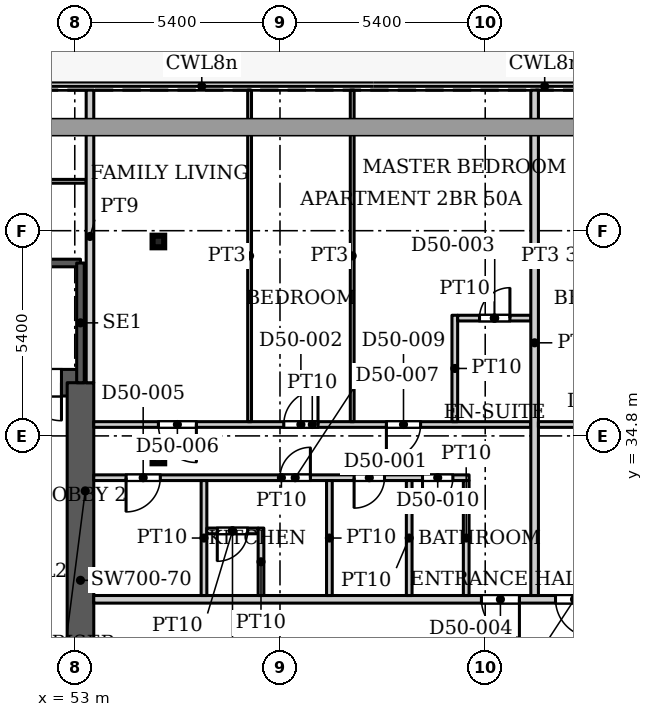
"""IFC4 building model, lengths in metres.
Left out: names, types, materials, properties, quantities, classifications, styles, units other than length and angle.
Written with IfcOpenShell. Run it as: python <this file> out.ifc"""

import sys

from ifc_helpers import new_model, si_unit, direction, frame, frame_2d, origin, origin_2d, place, context, subcontext, project, spatial, rectangle, hollow_rectangle, extrude, source, transform, mapped, element, fill, save


model = new_model("IFC4")
c1 = context("Model", 3, precision=1e-05, world=origin(), true_north=direction((0.0, 1.0)))
c2 = subcontext(c1, "Body", "Model", "MODEL_VIEW")
j1 = project(units=[si_unit("LENGTHUNIT", "METRE"), si_unit("PLANEANGLEUNIT", "RADIAN")], contexts=[c1])
p1 = place(None, origin())
s1 = spatial("IfcSite", under=j1, at=p1, CompositionType="ELEMENT")
p2 = place(p1, origin())
s2 = spatial("IfcBuilding", under=s1, at=p2, CompositionType="ELEMENT")
p3 = place(p2, frame((0.0, 0.0, 216.2)))
s3 = spatial("IfcBuildingStorey", under=s2, at=p3, CompositionType="ELEMENT", Elevation=216.2)
for number, where, z_axis, x_axis in (
    (1, (55.2, 34.232, 0.0), (0.0, 0.0, 1.0), (1.0, 0.0, 0.0)),
    (2, (55.2, 39.916, 0.0), (0.0, 0.0, 1.0), (1.0, 0.0, 0.0)),
):
    element("IfcColumn", number, at=place(p3, frame(where, z_axis=z_axis, x_axis=x_axis)), inside=s3, PredefinedType="COLUMN", context=c2, shape_type="SweptSolid", body=[
        extrude(hollow_rectangle(XDim=0.305, YDim=0.305, WallThickness=0.016, InnerFilletRadius=0.016, OuterFilletRadius=0.032, at=origin_2d()), origin(), (0.0, 0.0, 1.0), 3.9),
    ])
p4 = place(p3, frame((34.75, 36.2, 0.0), z_axis=(0.0, 0.0, 1.0), x_axis=(1.0, 0.0, 0.0)))
e3 = element("IfcWall", 3, at=p4, inside=s3, PredefinedType="SHEAR", context=c2, shape_type="SweptSolid", body=[
    extrude(rectangle(XDim=18.4, YDim=0.7, at=frame_2d((9.2, 0.0))), origin(), (0.0, 0.0, 1.0), 3.9),
])
p5 = place(p4, frame((16.9, 0.0, 0.0)))
e4 = element("IfcOpeningElement", 4, at=p5, cuts=e3, PredefinedType="OPENING", context=c2, shape_type="SweptSolid", body=[
    extrude(rectangle(XDim=1.0, YDim=2.2, at=frame_2d((0.5, 1.1))), frame((0.0, 0.36, 0.0), z_axis=(0.0, -1.0, 0.0), x_axis=(1.0, 0.0, 0.0)), (0.0, 0.0, 1.0), 0.72),
])
p6 = place(p3, frame((53.15, 25.8, 0.0), z_axis=(0.0, 0.0, 1.0), x_axis=(0.0, 1.0, 0.0)))
e5 = element("IfcWall", 5, at=p6, inside=s3, PredefinedType="SHEAR", context=c2, shape_type="SweptSolid", body=[
    extrude(rectangle(XDim=10.4, YDim=0.7, at=frame_2d((5.2, 0.0))), origin(), (0.0, 0.0, 1.0), 3.9),
])
p7 = place(p3, frame((43.99, 39.35, 0.0), z_axis=(0.0, 0.0, 1.0), x_axis=(1.0, 0.0, 0.0)))
e6 = element("IfcWall", 6, at=p7, inside=s3, PredefinedType="SHEAR", context=c2, shape_type="SweptSolid", body=[
    extrude(rectangle(XDim=9.16, YDim=0.2, at=frame_2d((4.58, 0.0))), origin(), (0.0, 0.0, 1.0), 3.9),
])
p8 = place(p3, frame((53.15, 36.2, 0.0), z_axis=(0.0, 0.0, 1.0), x_axis=(0.0, 1.0, 0.0)))
e7 = element("IfcWall", 7, at=p8, inside=s3, PredefinedType="SHEAR", context=c2, shape_type="SweptSolid", body=[
    extrude(rectangle(XDim=3.15, YDim=0.2, at=frame_2d((1.575, 0.0))), origin(), (0.0, 0.0, 1.0), 3.9),
])
p9 = place(p3, frame((38.349, 41.5, 0.0), z_axis=(0.0, 0.0, 1.0), x_axis=(1.0, 0.0, 0.0)))
e8 = element("IfcWall", 8, at=p9, inside=s3, PredefinedType="PARTITIONING", context=c2, shape_type="SweptSolid", body=[
    extrude(rectangle(XDim=14.951, YDim=0.1, at=frame_2d((7.476, 0.0))), origin(), (0.0, 0.0, 1.0), 3.6),
])
p10 = place(p9, frame((6.851, 0.0, 0.0)))
e9 = element("IfcOpeningElement", 9, at=p10, cuts=e8, PredefinedType="OPENING", context=c2, shape_type="SweptSolid", body=[
    extrude(rectangle(XDim=1.0, YDim=2.1, at=frame_2d((0.5, 1.05))), frame((0.0, 0.06, 0.0), z_axis=(0.0, -1.0, 0.0), x_axis=(1.0, 0.0, 0.0)), (0.0, 0.0, 1.0), 0.12),
])
p11 = place(p3, frame((53.4, 36.199, 0.0), z_axis=(0.0, 0.0, 1.0), x_axis=(0.0, 1.0, 0.0)))
e10 = element("IfcWall", 10, at=p11, inside=s3, PredefinedType="PARTITIONING", context=c2, shape_type="SweptSolid", body=[
    extrude(rectangle(XDim=7.701, YDim=0.2, at=frame_2d((3.851, 0.0))), origin(), (0.0, 0.0, 1.0), 3.6),
])
p12 = place(p3, frame((53.499, 30.5, 0.0), z_axis=(0.0, 0.0, 1.0), x_axis=(1.0, 0.0, 0.0)))
e11 = element("IfcWall", 11, at=p12, inside=s3, PredefinedType="PARTITIONING", context=c2, shape_type="SweptSolid", body=[
    extrude(rectangle(XDim=28.401, YDim=0.2, at=frame_2d((14.2, 0.0))), origin(), (0.0, 0.0, 1.0), 3.6),
])
p13 = place(p12, frame((10.201, 0.0, 0.0)))
e12 = element("IfcOpeningElement", 12, at=p13, cuts=e11, PredefinedType="OPENING", context=c2, shape_type="SweptSolid", body=[
    extrude(rectangle(XDim=1.0, YDim=2.1, at=frame_2d((0.5, 1.05))), frame((0.0, 0.11, 0.0), z_axis=(0.0, -1.0, 0.0), x_axis=(1.0, 0.0, 0.0)), (0.0, 0.0, 1.0), 0.22),
])
p14 = place(p12, frame((12.151, 0.0, 0.0)))
e13 = element("IfcOpeningElement", 13, at=p14, cuts=e11, PredefinedType="OPENING", context=c2, shape_type="SweptSolid", body=[
    extrude(rectangle(XDim=1.0, YDim=2.1, at=frame_2d((0.5, 1.05))), frame((0.0, 0.11, 0.0), z_axis=(0.0, -1.0, 0.0), x_axis=(1.0, 0.0, 0.0)), (0.0, 0.0, 1.0), 0.22),
])
p15 = place(p12, frame((24.001, 0.0, 0.0)))
e14 = element("IfcOpeningElement", 14, at=p15, cuts=e11, PredefinedType="OPENING", context=c2, shape_type="SweptSolid", body=[
    extrude(rectangle(XDim=1.0, YDim=2.1, at=frame_2d((0.5, 1.05))), frame((0.0, 0.11, 0.0), z_axis=(0.0, -1.0, 0.0), x_axis=(1.0, 0.0, 0.0)), (0.0, 0.0, 1.0), 0.22),
])
p16 = place(p3, frame((53.499, 33.7, 0.0), z_axis=(0.0, 0.0, 1.0), x_axis=(1.0, 0.0, 0.0)))
e15 = element("IfcWall", 15, at=p16, inside=s3, PredefinedType="PARTITIONING", context=c2, shape_type="SweptSolid", body=[
    extrude(rectangle(XDim=9.876, YDim=0.15, at=frame_2d((4.938, 0.0))), origin(), (0.0, 0.0, 1.0), 3.6),
])
p17 = place(p16, frame((6.851, 0.0, 0.0)))
e16 = element("IfcOpeningElement", 16, at=p17, cuts=e15, PredefinedType="OPENING", context=c2, shape_type="SweptSolid", body=[
    extrude(rectangle(XDim=0.8, YDim=2.1, at=frame_2d((0.4, 1.05))), frame((0.0, 0.085, 0.0), z_axis=(0.0, -1.0, 0.0), x_axis=(1.0, 0.0, 0.0)), (0.0, 0.0, 1.0), 0.17),
])
p18 = place(p16, frame((0.851, 0.0, 0.0)))
e17 = element("IfcOpeningElement", 17, at=p18, cuts=e15, PredefinedType="OPENING", context=c2, shape_type="SweptSolid", body=[
    extrude(rectangle(XDim=0.9, YDim=2.1, at=frame_2d((0.45, 1.05))), frame((0.0, 0.085, 0.0), z_axis=(0.0, -1.0, 0.0), x_axis=(1.0, 0.0, 0.0)), (0.0, 0.0, 1.0), 0.17),
])
p19 = place(p16, frame((4.901, 0.0, 0.0)))
e18 = element("IfcOpeningElement", 18, at=p19, cuts=e15, PredefinedType="OPENING", context=c2, shape_type="SweptSolid", body=[
    extrude(rectangle(XDim=0.8, YDim=2.1, at=frame_2d((0.4, 1.05))), frame((0.0, 0.085, 0.0), z_axis=(0.0, -1.0, 0.0), x_axis=(1.0, 0.0, 0.0)), (0.0, 0.0, 1.0), 0.17),
])
p20 = place(p16, frame((8.651, 0.0, 0.0)))
e19 = element("IfcOpeningElement", 19, at=p20, cuts=e15, PredefinedType="OPENING", context=c2, shape_type="SweptSolid", body=[
    extrude(rectangle(XDim=0.8, YDim=2.1, at=frame_2d((0.4, 1.05))), frame((0.0, 0.085, 0.0), z_axis=(0.0, -1.0, 0.0), x_axis=(1.0, 0.0, 0.0)), (0.0, 0.0, 1.0), 0.17),
])
p21 = place(p3, frame((53.499, 35.1, 0.0), z_axis=(0.0, 0.0, 1.0), x_axis=(1.0, 0.0, 0.0)))
e20 = element("IfcWall", 20, at=p21, inside=s3, PredefinedType="PARTITIONING", context=c2, shape_type="SweptSolid", body=[
    extrude(rectangle(XDim=11.501, YDim=0.15, at=frame_2d((5.75, 0.0))), origin(), (0.0, 0.0, 1.0), 3.6),
])
p22 = place(p21, frame((5.001, 0.0, 0.0)))
e21 = element("IfcOpeningElement", 21, at=p22, cuts=e20, PredefinedType="OPENING", context=c2, shape_type="SweptSolid", body=[
    extrude(rectangle(XDim=0.9, YDim=2.1, at=frame_2d((0.45, 1.05))), frame((0.0, 0.085, 0.0), z_axis=(0.0, -1.0, 0.0), x_axis=(1.0, 0.0, 0.0)), (0.0, 0.0, 1.0), 0.17),
])
p23 = place(p21, frame((1.701, 0.0, 0.0)))
e22 = element("IfcOpeningElement", 22, at=p23, cuts=e20, PredefinedType="OPENING", context=c2, shape_type="SweptSolid", body=[
    extrude(rectangle(XDim=1.0, YDim=2.1, at=frame_2d((0.5, 1.05))), frame((0.0, 0.085, 0.0), z_axis=(0.0, -1.0, 0.0), x_axis=(1.0, 0.0, 0.0)), (0.0, 0.0, 1.0), 0.17),
])
p24 = place(p21, frame((7.701, 0.0, 0.0)))
e23 = element("IfcOpeningElement", 23, at=p24, cuts=e20, PredefinedType="OPENING", context=c2, shape_type="SweptSolid", body=[
    extrude(rectangle(XDim=0.9, YDim=2.1, at=frame_2d((0.45, 1.05))), frame((0.0, 0.085, 0.0), z_axis=(0.0, -1.0, 0.0), x_axis=(1.0, 0.0, 0.0)), (0.0, 0.0, 1.0), 0.17),
])
p25 = place(p3, frame((56.4, 30.6, 0.0), z_axis=(0.0, 0.0, 1.0), x_axis=(0.0, 1.0, 0.0)))
e24 = element("IfcWall", 24, at=p25, inside=s3, PredefinedType="PARTITIONING", context=c2, shape_type="SweptSolid", body=[
    extrude(rectangle(XDim=3.025, YDim=0.15, at=frame_2d((1.512, 0.0))), origin(), (0.0, 0.0, 1.0), 3.6),
])
p26 = place(p3, frame((56.475, 32.3, 0.0), z_axis=(0.0, 0.0, 1.0), x_axis=(1.0, 0.0, 0.0)))
e25 = element("IfcWall", 25, at=p26, inside=s3, PredefinedType="PARTITIONING", context=c2, shape_type="SweptSolid", body=[
    extrude(rectangle(XDim=1.35, YDim=0.15, at=frame_2d((0.675, 0.0))), origin(), (0.0, 0.0, 1.0), 3.6),
])
p27 = place(p26, frame((0.275, 0.0, 0.0)))
e26 = element("IfcOpeningElement", 26, at=p27, cuts=e25, PredefinedType="OPENING", context=c2, shape_type="SweptSolid", body=[
    extrude(rectangle(XDim=0.8, YDim=2.1, at=frame_2d((0.4, 1.05))), frame((0.0, 0.085, 0.0), z_axis=(0.0, -1.0, 0.0), x_axis=(1.0, 0.0, 0.0)), (0.0, 0.0, 1.0), 0.17),
])
p28 = place(p3, frame((57.6, 35.175, 0.0), z_axis=(0.0, 0.0, 1.0), x_axis=(0.0, 1.0, 0.0)))
e27 = element("IfcWall", 27, at=p28, inside=s3, PredefinedType="PARTITIONING", context=c2, shape_type="SweptSolid", body=[
    extrude(rectangle(XDim=8.725, YDim=0.1, at=frame_2d((4.362, 0.0))), origin(), (0.0, 0.0, 1.0), 3.6),
])
p29 = place(p3, frame((57.9, 30.6, 0.0), z_axis=(0.0, 0.0, 1.0), x_axis=(0.0, 1.0, 0.0)))
e28 = element("IfcWall", 28, at=p29, inside=s3, PredefinedType="PARTITIONING", context=c2, shape_type="SweptSolid", body=[
    extrude(rectangle(XDim=1.775, YDim=0.15, at=frame_2d((0.887, 0.0))), origin(), (0.0, 0.0, 1.0), 3.6),
])
p30 = place(p3, frame((59.7, 30.6, 0.0), z_axis=(0.0, 0.0, 1.0), x_axis=(0.0, 1.0, 0.0)))
e29 = element("IfcWall", 29, at=p30, inside=s3, PredefinedType="PARTITIONING", context=c2, shape_type="SweptSolid", body=[
    extrude(rectangle(XDim=3.025, YDim=0.15, at=frame_2d((1.512, 0.0))), origin(), (0.0, 0.0, 1.0), 3.6),
])
p31 = place(p3, frame((60.3, 35.175, 0.0), z_axis=(0.0, 0.0, 1.0), x_axis=(0.0, 1.0, 0.0)))
e30 = element("IfcWall", 30, at=p31, inside=s3, PredefinedType="PARTITIONING", context=c2, shape_type="SweptSolid", body=[
    extrude(rectangle(XDim=8.725, YDim=0.1, at=frame_2d((4.362, 0.0))), origin(), (0.0, 0.0, 1.0), 3.6),
])
p32 = place(p3, frame((61.8, 30.6, 0.0), z_axis=(0.0, 0.0, 1.0), x_axis=(0.0, 1.0, 0.0)))
e31 = element("IfcWall", 31, at=p32, inside=s3, PredefinedType="PARTITIONING", context=c2, shape_type="SweptSolid", body=[
    extrude(rectangle(XDim=3.025, YDim=0.15, at=frame_2d((1.512, 0.0))), origin(), (0.0, 0.0, 1.0), 3.6),
])
p33 = place(p3, frame((63.0, 35.175, 0.0), z_axis=(0.0, 0.0, 1.0), x_axis=(0.0, 1.0, 0.0)))
e32 = element("IfcWall", 32, at=p33, inside=s3, PredefinedType="PARTITIONING", context=c2, shape_type="SweptSolid", body=[
    extrude(rectangle(XDim=2.8, YDim=0.15, at=frame_2d((1.4, 0.0))), origin(), (0.0, 0.0, 1.0), 3.6),
])
p34 = place(p3, frame((63.075, 37.9, 0.0), z_axis=(0.0, 0.0, 1.0), x_axis=(1.0, 0.0, 0.0)))
e33 = element("IfcWall", 33, at=p34, inside=s3, PredefinedType="PARTITIONING", context=c2, shape_type="SweptSolid", body=[
    extrude(rectangle(XDim=1.925, YDim=0.15, at=frame_2d((0.962, 0.0))), origin(), (0.0, 0.0, 1.0), 3.6),
])
p35 = place(p34, frame((0.575, 0.0, 0.0)))
e34 = element("IfcOpeningElement", 34, at=p35, cuts=e33, PredefinedType="OPENING", context=c2, shape_type="SweptSolid", body=[
    extrude(rectangle(XDim=0.8, YDim=2.1, at=frame_2d((0.4, 1.05))), frame((0.0, 0.085, 0.0), z_axis=(0.0, -1.0, 0.0), x_axis=(1.0, 0.0, 0.0)), (0.0, 0.0, 1.0), 0.17),
])
p36 = place(p3, frame((63.3, 30.6, 0.0), z_axis=(0.0, 0.0, 1.0), x_axis=(0.0, 1.0, 0.0)))
e35 = element("IfcWall", 35, at=p36, inside=s3, PredefinedType="PARTITIONING", context=c2, shape_type="SweptSolid", body=[
    extrude(rectangle(XDim=3.025, YDim=0.15, at=frame_2d((1.512, 0.0))), origin(), (0.0, 0.0, 1.0), 3.6),
])
p37 = place(p3, frame((65.1, 30.6, 0.0), z_axis=(0.0, 0.0, 1.0), x_axis=(0.0, 1.0, 0.0)))
e36 = element("IfcWall", 36, at=p37, inside=s3, PredefinedType="PARTITIONING", context=c2, shape_type="SweptSolid", body=[
    extrude(rectangle(XDim=13.3, YDim=0.2, at=frame_2d((6.65, 0.0))), origin(), (0.0, 0.0, 1.0), 3.6),
])
p38 = place(p3, frame((65.2, 35.1, 0.0), z_axis=(0.0, 0.0, 1.0), x_axis=(1.0, 0.0, 0.0)))
e37 = element("IfcWall", 37, at=p38, inside=s3, PredefinedType="PARTITIONING", context=c2, shape_type="SweptSolid", body=[
    extrude(rectangle(XDim=9.4, YDim=0.15, at=frame_2d((4.7, 0.0))), origin(), (0.0, 0.0, 1.0), 3.6),
])
p39 = place(p38, frame((1.4, 0.0, 0.0)))
e38 = element("IfcOpeningElement", 38, at=p39, cuts=e37, PredefinedType="OPENING", context=c2, shape_type="SweptSolid", body=[
    extrude(rectangle(XDim=0.9, YDim=2.1, at=frame_2d((0.45, 1.05))), frame((0.0, 0.085, 0.0), z_axis=(0.0, -1.0, 0.0), x_axis=(1.0, 0.0, 0.0)), (0.0, 0.0, 1.0), 0.17),
])
p40 = place(p38, frame((6.15, 0.0, 0.0)))
e39 = element("IfcOpeningElement", 39, at=p40, cuts=e37, PredefinedType="OPENING", context=c2, shape_type="SweptSolid", body=[
    extrude(rectangle(XDim=1.0, YDim=2.1, at=frame_2d((0.5, 1.05))), frame((0.0, 0.085, 0.0), z_axis=(0.0, -1.0, 0.0), x_axis=(1.0, 0.0, 0.0)), (0.0, 0.0, 1.0), 0.17),
])
m1 = source(origin(), c2, "Body", "SweptSolid", [
    extrude(rectangle(XDim=1.0, YDim=2.2, at=frame_2d((0.5, 1.1))), frame((0.0, 0.025, 0.0), z_axis=(0.0, -1.0, 0.0), x_axis=(1.0, 0.0, 0.0)), (0.0, 0.0, 1.0), 0.05),
])
p41 = place(p5, origin())
e40 = element("IfcDoor", 40, at=p41, inside=s3, OperationType="SINGLE_SWING_RIGHT", PredefinedType="DOOR", context=c2, shape_type="MappedRepresentation", body=[
    mapped(m1, transform((0.0, 0.0, 0.0), x_axis=(1.0, 0.0, 0.0), y_axis=(0.0, 1.0, 0.0), z_axis=(0.0, 0.0, 1.0), scale=1.0)),
])
fill(e4, e40)
m2 = source(origin(), c2, "Body", "SweptSolid", [
    extrude(rectangle(XDim=0.8, YDim=2.1, at=frame_2d((0.4, 1.05))), frame((0.0, 0.025, 0.0), z_axis=(0.0, -1.0, 0.0), x_axis=(1.0, 0.0, 0.0)), (0.0, 0.0, 1.0), 0.05),
])
p42 = place(p17, origin())
e41 = element("IfcDoor", 41, at=p42, inside=s3, OperationType="SINGLE_SWING_RIGHT", PredefinedType="DOOR", context=c2, shape_type="MappedRepresentation", body=[
    mapped(m2, transform((0.0, 0.0, 0.0), x_axis=(1.0, 0.0, 0.0), y_axis=(0.0, 1.0, 0.0), z_axis=(0.0, 0.0, 1.0), scale=1.0)),
])
fill(e16, e41)
m3 = source(origin(), c2, "Body", "SweptSolid", [
    extrude(rectangle(XDim=0.9, YDim=2.1, at=frame_2d((0.45, 1.05))), frame((0.0, 0.025, 0.0), z_axis=(0.0, -1.0, 0.0), x_axis=(1.0, 0.0, 0.0)), (0.0, 0.0, 1.0), 0.05),
])
p43 = place(p22, origin())
e42 = element("IfcDoor", 42, at=p43, inside=s3, OperationType="SINGLE_SWING_LEFT", PredefinedType="DOOR", context=c2, shape_type="MappedRepresentation", body=[
    mapped(m3, transform((0.0, 0.0, 0.0), x_axis=(1.0, 0.0, 0.0), y_axis=(0.0, 1.0, 0.0), z_axis=(0.0, 0.0, 1.0), scale=1.0)),
])
fill(e21, e42)
p44 = place(p35, origin())
e43 = element("IfcDoor", 43, at=p44, inside=s3, OperationType="SINGLE_SWING_LEFT", PredefinedType="DOOR", context=c2, shape_type="MappedRepresentation", body=[
    mapped(m2, transform((0.0, 0.0, 0.0), x_axis=(1.0, 0.0, 0.0), y_axis=(0.0, 1.0, 0.0), z_axis=(0.0, 0.0, 1.0), scale=1.0)),
])
fill(e34, e43)
m4 = source(origin(), c2, "Body", "SweptSolid", [
    extrude(rectangle(XDim=1.0, YDim=2.1, at=frame_2d((0.5, 1.05))), frame((0.0, 0.025, 0.0), z_axis=(0.0, -1.0, 0.0), x_axis=(1.0, 0.0, 0.0)), (0.0, 0.0, 1.0), 0.05),
])
p45 = place(p13, origin())
e44 = element("IfcDoor", 44, at=p45, inside=s3, OperationType="SINGLE_SWING_RIGHT", PredefinedType="DOOR", context=c2, shape_type="MappedRepresentation", body=[
    mapped(m4, transform((0.0, 0.0, 0.0), x_axis=(1.0, 0.0, 0.0), y_axis=(0.0, 1.0, 0.0), z_axis=(0.0, 0.0, 1.0), scale=1.0)),
])
fill(e12, e44)
p46 = place(p18, origin())
e45 = element("IfcDoor", 45, at=p46, inside=s3, OperationType="SINGLE_SWING_RIGHT", PredefinedType="DOOR", context=c2, shape_type="MappedRepresentation", body=[
    mapped(m3, transform((0.0, 0.0, 0.0), x_axis=(1.0, 0.0, 0.0), y_axis=(0.0, 1.0, 0.0), z_axis=(0.0, 0.0, 1.0), scale=1.0)),
])
fill(e17, e45)
m5 = source(origin(), c2, "Body", "SweptSolid", [
    extrude(rectangle(XDim=1.0, YDim=2.1, at=frame_2d((0.5, 1.05))), frame((0.0, 0.025, 0.0), z_axis=(0.0, -1.0, 0.0), x_axis=(1.0, 0.0, 0.0)), (0.0, 0.0, 1.0), 0.05),
])
p47 = place(p23, origin())
e46 = element("IfcDoor", 46, at=p47, inside=s3, OperationType="SINGLE_SWING_RIGHT", PredefinedType="DOOR", context=c2, shape_type="MappedRepresentation", body=[
    mapped(m5, transform((0.0, 0.0, 0.0), x_axis=(1.0, 0.0, 0.0), y_axis=(0.0, 1.0, 0.0), z_axis=(0.0, 0.0, 1.0), scale=1.0)),
])
fill(e22, e46)
p48 = place(p19, origin())
e47 = element("IfcDoor", 47, at=p48, inside=s3, OperationType="SINGLE_SWING_LEFT", PredefinedType="DOOR", context=c2, shape_type="MappedRepresentation", body=[
    mapped(m2, transform((0.0, 0.0, 0.0), x_axis=(1.0, 0.0, 0.0), y_axis=(0.0, 1.0, 0.0), z_axis=(0.0, 0.0, 1.0), scale=1.0)),
])
fill(e18, e47)
p49 = place(p27, origin())
e48 = element("IfcDoor", 48, at=p49, inside=s3, OperationType="SINGLE_SWING_RIGHT", PredefinedType="DOOR", context=c2, shape_type="MappedRepresentation", body=[
    mapped(m2, transform((0.0, 0.0, 0.0), x_axis=(1.0, 0.0, 0.0), y_axis=(0.0, 1.0, 0.0), z_axis=(0.0, 0.0, 1.0), scale=1.0)),
])
fill(e26, e48)
p50 = place(p24, origin())
e49 = element("IfcDoor", 49, at=p50, inside=s3, OperationType="SINGLE_SWING_RIGHT", PredefinedType="DOOR", context=c2, shape_type="MappedRepresentation", body=[
    mapped(m3, transform((0.0, 0.0, 0.0), x_axis=(1.0, 0.0, 0.0), y_axis=(0.0, 1.0, 0.0), z_axis=(0.0, 0.0, 1.0), scale=1.0)),
])
fill(e23, e49)
p51 = place(p20, origin())
e50 = element("IfcDoor", 50, at=p51, inside=s3, OperationType="SINGLE_SWING_RIGHT", PredefinedType="DOOR", context=c2, shape_type="MappedRepresentation", body=[
    mapped(m2, transform((0.0, 0.0, 0.0), x_axis=(1.0, 0.0, 0.0), y_axis=(0.0, 1.0, 0.0), z_axis=(0.0, 0.0, 1.0), scale=1.0)),
])
fill(e19, e50)
p52 = place(p14, origin())
e51 = element("IfcDoor", 51, at=p52, inside=s3, OperationType="SINGLE_SWING_RIGHT", PredefinedType="DOOR", context=c2, shape_type="MappedRepresentation", body=[
    mapped(m4, transform((0.0, 0.0, 0.0), x_axis=(1.0, 0.0, 0.0), y_axis=(0.0, 1.0, 0.0), z_axis=(0.0, 0.0, 1.0), scale=1.0)),
])
fill(e13, e51)
save(model, sys.argv[1])
